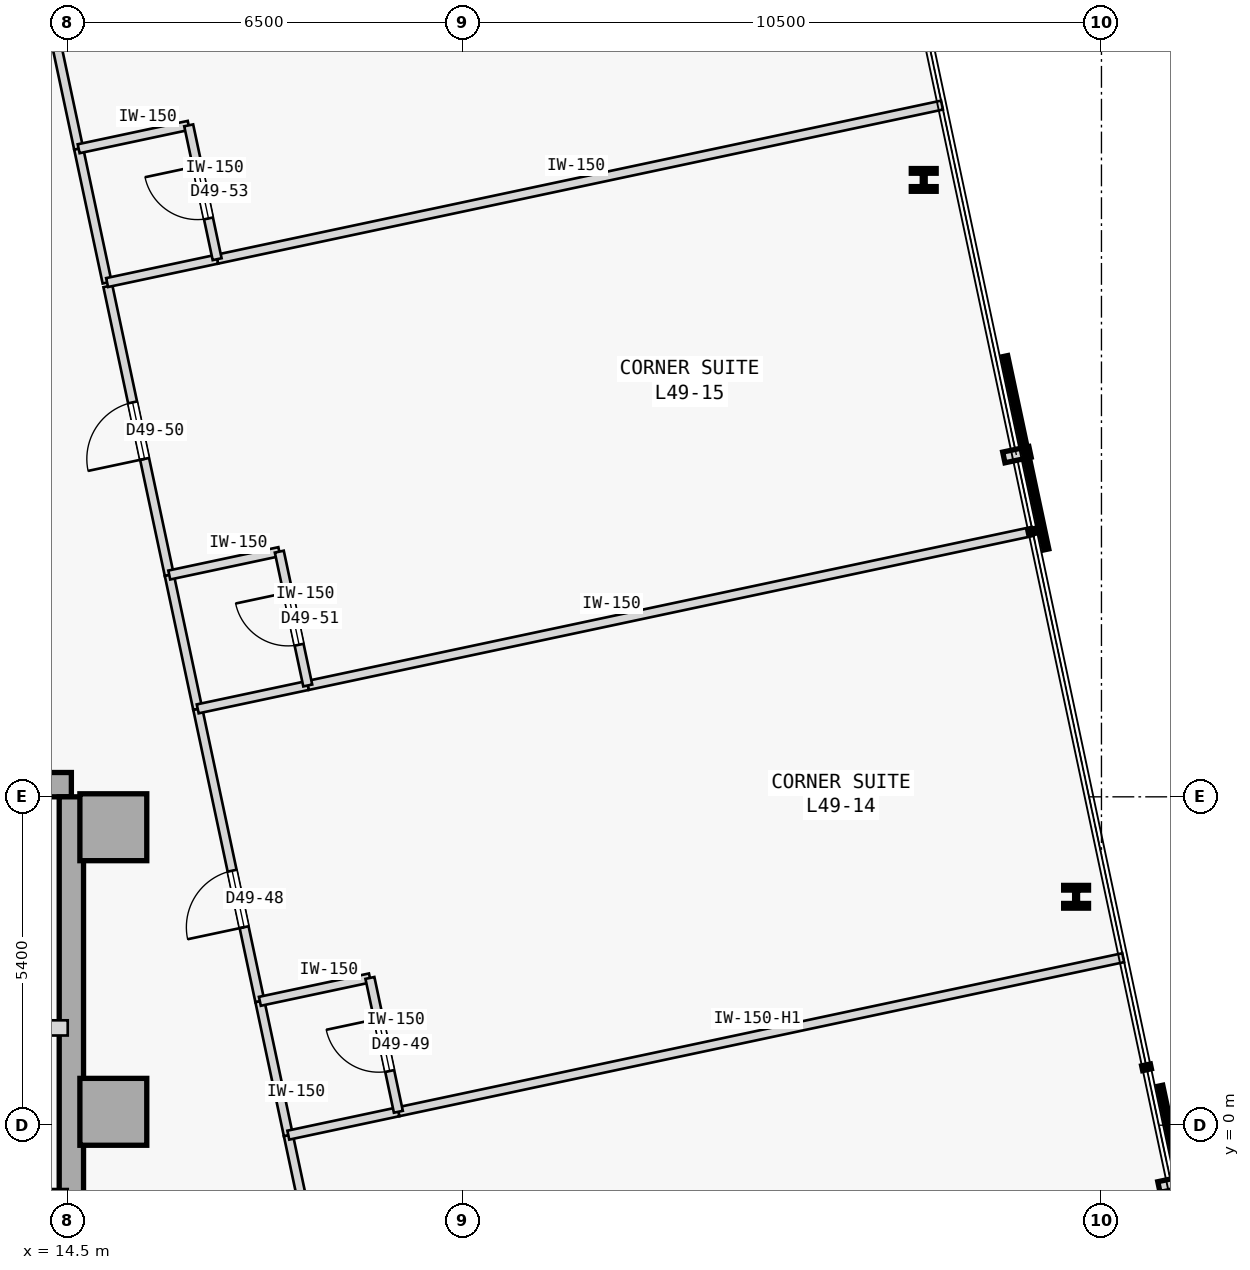
"""IFC4 building model, lengths in metres.
Left out: names, types, materials, properties, quantities, classifications, styles, units other than length and angle.
Written with IfcOpenShell. Run it as: python <this file> out.ifc"""

import sys

from ifc_helpers import new_model, si_unit, direction, frame, frame_2d, origin, origin_2d, place, context, subcontext, project, spatial, rectangle, i_section, extrude, element, fill, save


model = new_model("IFC4")
c1 = context("Model", 3, precision=1e-05, world=origin(), true_north=direction((0.0, 1.0)))
c2 = subcontext(c1, "Body", "Model", "MODEL_VIEW")
j1 = project(units=[si_unit("LENGTHUNIT", "METRE"), si_unit("PLANEANGLEUNIT", "RADIAN")], contexts=[c1])
p1 = place(None, origin())
s1 = spatial("IfcSite", under=j1, at=p1, CompositionType="ELEMENT")
p2 = place(p1, origin())
s2 = spatial("IfcBuilding", under=s1, at=p2, CompositionType="ELEMENT")
p3 = place(p2, frame((0.0, 0.0, 188.8)))
s3 = spatial("IfcBuildingStorey", under=s2, at=p3, CompositionType="ELEMENT", Elevation=188.8)
for number, where, z_axis, x_axis in (
    (1, (15.25, 4.9, 0.0), (0.0, 0.0, 1.0), (1.0, 0.0, 0.0)),
    (2, (15.25, 0.22, 0.0), (0.0, 0.0, 1.0), (1.0, 0.0, 0.0)),
):
    element("IfcColumn", number, at=place(p3, frame(where, z_axis=z_axis, x_axis=x_axis)), inside=s3, PredefinedType="COLUMN", context=c2, shape_type="SweptSolid", body=[
        extrude(rectangle(XDim=1.1, YDim=1.1, at=origin_2d()), origin(), (0.0, 0.0, 1.0), 3.4),
    ])
p4 = place(p3, frame((3.15, 5.6, 0.0), z_axis=(0.0, 0.0, 1.0), x_axis=(1.0, 0.0, 0.0)))
e3 = element("IfcWall", 3, at=p4, inside=s3, PredefinedType="SHEAR", context=c2, shape_type="SweptSolid", body=[
    extrude(rectangle(XDim=11.41, YDim=0.4, at=frame_2d((5.705, 0.0))), origin(), (0.0, 0.0, 1.0), 3.175),
])
p5 = place(p3, frame((14.56, -5.4, 0.0), z_axis=(0.0, 0.0, 1.0), x_axis=(0.0, 1.0, 0.0)))
e4 = element("IfcWall", 4, at=p5, inside=s3, PredefinedType="SHEAR", context=c2, shape_type="SweptSolid", body=[
    extrude(rectangle(XDim=10.8, YDim=0.4, at=frame_2d((5.4, 0.0))), origin(), (0.0, 0.0, 1.0), 3.175),
])
for number, where, z_axis, x_axis in (
    (5, (31.083, 3.756, 0.0), (0.0, 0.0, 1.0), (1.0, 0.0, 0.0)),
    (6, (28.577, 15.545, 0.0), (0.0, 0.0, 1.0), (1.0, 0.0, 0.0)),
):
    element("IfcColumn", number, at=place(p3, frame(where, z_axis=z_axis, x_axis=x_axis)), inside=s3, PredefinedType="COLUMN", context=c2, shape_type="SweptSolid", body=[
        extrude(i_section(OverallWidth=0.409, OverallDepth=0.374, WebThickness=0.048, FlangeThickness=0.077, FilletRadius=0.015, at=origin_2d()), origin(), (0.0, 0.0, 1.0), 3.4),
    ])
p6 = place(p3, frame((10.9, 1.6, 0.0), z_axis=(0.0, 0.0, 1.0), x_axis=(1.0, 0.0, 0.0)))
e7 = element("IfcWall", 7, at=p6, inside=s3, PredefinedType="STANDARD", context=c2, shape_type="SweptSolid", body=[
    extrude(rectangle(XDim=3.6, YDim=0.25, at=frame_2d((1.8, 0.0))), origin(), (0.0, 0.0, 1.0), 3.175),
])
p7 = place(p6, frame((1.62, 0.0, 0.0)))
e8 = element("IfcOpeningElement", 8, at=p7, cuts=e7, PredefinedType="OPENING", context=c2, shape_type="SweptSolid", body=[
    extrude(rectangle(XDim=1.05, YDim=2.15, at=frame_2d((0.525, 1.075))), frame((0.0, 0.135, 0.0), z_axis=(0.0, -1.0, 0.0), x_axis=(1.0, 0.0, 0.0)), (0.0, 0.0, 1.0), 0.27),
])
p8 = place(p3, frame((11.55, -1.15, 0.0), z_axis=(0.0, 0.0, 1.0), x_axis=(1.0, 0.0, 0.0)))
e9 = element("IfcWall", 9, at=p8, inside=s3, PredefinedType="STANDARD", context=c2, shape_type="SweptSolid", body=[
    extrude(rectangle(XDim=2.95, YDim=0.2, at=frame_2d((1.475, 0.0))), origin(), (0.0, 0.0, 1.0), 3.175),
])
p9 = place(p8, frame((0.75, 0.0, 0.0)))
e10 = element("IfcOpeningElement", 10, at=p9, cuts=e9, PredefinedType="OPENING", context=c2, shape_type="SweptSolid", body=[
    extrude(rectangle(XDim=1.05, YDim=2.18, at=frame_2d((0.525, 1.09))), frame((0.0, 0.11, 0.0), z_axis=(0.0, -1.0, 0.0), x_axis=(1.0, 0.0, 0.0)), (0.0, 0.0, 1.0), 0.22),
])
p10 = place(p3, frame((19.15, -4.972, 0.0), z_axis=(0.0, 0.0, 1.0), x_axis=(-0.207934781332, 0.978142692409, 0.0)))
e11 = element("IfcWall", 11, at=p10, inside=s3, PredefinedType="PARTITIONING", context=c2, shape_type="SweptSolid", body=[
    extrude(rectangle(XDim=4.916, YDim=0.15, at=frame_2d((2.458, 0.0))), origin(), (0.0, 0.0, 1.0), 3.175),
])
p11 = place(p10, frame((1.983, 0.0, 0.0)))
e12 = element("IfcOpeningElement", 12, at=p11, cuts=e11, PredefinedType="OPENING", context=c2, shape_type="SweptSolid", body=[
    extrude(rectangle(XDim=0.95, YDim=2.15, at=frame_2d((0.475, 1.075))), frame((0.0, 0.085, 0.0), z_axis=(0.0, -1.0, 0.0), x_axis=(1.0, 0.0, 0.0)), (0.0, 0.0, 1.0), 0.17),
])
p12 = place(p3, frame((17.66, 2.037, 0.0), z_axis=(0.0, 0.0, 1.0), x_axis=(-0.207894386012, 0.978151278824, 0.0)))
e13 = element("IfcWall", 13, at=p12, inside=s3, PredefinedType="PARTITIONING", context=c2, shape_type="SweptSolid", body=[
    extrude(rectangle(XDim=4.917, YDim=0.15, at=frame_2d((2.458, 0.0))), origin(), (0.0, 0.0, 1.0), 3.175),
])
p13 = place(p12, frame((1.246, 0.0, 0.0)))
e14 = element("IfcOpeningElement", 14, at=p13, cuts=e13, PredefinedType="OPENING", context=c2, shape_type="SweptSolid", body=[
    extrude(rectangle(XDim=0.95, YDim=2.15, at=frame_2d((0.475, 1.075))), frame((0.0, 0.085, 0.0), z_axis=(0.0, -1.0, 0.0), x_axis=(1.0, 0.0, 0.0)), (0.0, 0.0, 1.0), 0.17),
])
p14 = place(p3, frame((18.128, -0.164, 0.0), z_axis=(0.0, 0.0, 1.0), x_axis=(-0.207891197838, 0.978151956427, 0.0)))
e15 = element("IfcWall", 15, at=p14, inside=s3, PredefinedType="PARTITIONING", context=c2, shape_type="SweptSolid", body=[
    extrude(rectangle(XDim=2.25, YDim=0.15, at=frame_2d((1.125, 0.0))), origin(), (0.0, 0.0, 1.0), 3.175),
])
p15 = place(p3, frame((16.17, 9.047, 0.0), z_axis=(0.0, 0.0, 1.0), x_axis=(-0.20792851832, 0.978144023787, 0.0)))
e16 = element("IfcWall", 16, at=p15, inside=s3, PredefinedType="PARTITIONING", context=c2, shape_type="SweptSolid", body=[
    extrude(rectangle(XDim=4.855, YDim=0.15, at=frame_2d((2.428, 0.0))), origin(), (0.0, 0.0, 1.0), 3.175),
])
p16 = place(p15, frame((1.952, 0.0, 0.0)))
e17 = element("IfcOpeningElement", 17, at=p16, cuts=e16, PredefinedType="OPENING", context=c2, shape_type="SweptSolid", body=[
    extrude(rectangle(XDim=0.95, YDim=2.15, at=frame_2d((0.475, 1.075))), frame((0.0, 0.085, 0.0), z_axis=(0.0, -1.0, 0.0), x_axis=(1.0, 0.0, 0.0)), (0.0, 0.0, 1.0), 0.17),
])
p17 = place(p3, frame((16.638, 6.847, 0.0), z_axis=(0.0, 0.0, 1.0), x_axis=(-0.207913264065, 0.978147266328, 0.0)))
e18 = element("IfcWall", 18, at=p17, inside=s3, PredefinedType="PARTITIONING", context=c2, shape_type="SweptSolid", body=[
    extrude(rectangle(XDim=2.25, YDim=0.15, at=frame_2d((1.125, 0.0))), origin(), (0.0, 0.0, 1.0), 3.175),
])
p18 = place(p3, frame((14.68, 16.058, 0.0), z_axis=(0.0, 0.0, 1.0), x_axis=(-0.207887265829, 0.978152792107, 0.0)))
e19 = element("IfcWall", 19, at=p18, inside=s3, PredefinedType="PARTITIONING", context=c2, shape_type="SweptSolid", body=[
    extrude(rectangle(XDim=4.916, YDim=0.15, at=frame_2d((2.458, 0.0))), origin(), (0.0, 0.0, 1.0), 3.175),
])
p19 = place(p18, frame((1.983, 0.0, 0.0)))
e20 = element("IfcOpeningElement", 20, at=p19, cuts=e19, PredefinedType="OPENING", context=c2, shape_type="SweptSolid", body=[
    extrude(rectangle(XDim=0.95, YDim=2.15, at=frame_2d((0.475, 1.075))), frame((0.0, 0.085, 0.0), z_axis=(0.0, -1.0, 0.0), x_axis=(1.0, 0.0, 0.0)), (0.0, 0.0, 1.0), 0.17),
])
p20 = place(p3, frame((15.148, 13.857, 0.0), z_axis=(0.0, 0.0, 1.0), x_axis=(-0.207995007687, 0.978129887478, 0.0)))
e21 = element("IfcWall", 21, at=p20, inside=s3, PredefinedType="PARTITIONING", context=c2, shape_type="SweptSolid", body=[
    extrude(rectangle(XDim=2.25, YDim=0.15, at=frame_2d((1.125, 0.0))), origin(), (0.0, 0.0, 1.0), 3.175),
])
p21 = place(p3, frame((19.938, 0.221, 0.0), z_axis=(0.0, 0.0, 1.0), x_axis=(0.978144694478, 0.207925363208, 0.0)))
e22 = element("IfcWall", 22, at=p21, inside=s3, PredefinedType="PARTITIONING", context=c2, shape_type="SweptSolid", body=[
    extrude(rectangle(XDim=12.187, YDim=0.15, at=frame_2d((6.093, 0.0))), origin(), (0.0, 0.0, 1.0), 2.725),
])
p22 = place(p3, frame((18.128, -0.164, 0.0), z_axis=(0.0, 0.0, 1.0), x_axis=(0.978165892835, 0.207825614625, 0.0)))
e23 = element("IfcWall", 23, at=p22, inside=s3, PredefinedType="PARTITIONING", context=c2, shape_type="SweptSolid", body=[
    extrude(rectangle(XDim=1.85, YDim=0.15, at=frame_2d((0.925, 0.0))), origin(), (0.0, 0.0, 1.0), 3.175),
])
p23 = place(p3, frame((17.66, 2.037, 0.0), z_axis=(0.0, 0.0, 1.0), x_axis=(0.978160192495, 0.207852442415, 0.0)))
e24 = element("IfcWall", 24, at=p23, inside=s3, PredefinedType="PARTITIONING", context=c2, shape_type="SweptSolid", body=[
    extrude(rectangle(XDim=1.85, YDim=0.15, at=frame_2d((0.925, 0.0))), origin(), (0.0, 0.0, 1.0), 3.175),
])
p24 = place(p3, frame((19.938, 0.221, 0.0), z_axis=(0.0, 0.0, 1.0), x_axis=(-0.207995007687, 0.978129887478, 0.0)))
e25 = element("IfcWall", 25, at=p24, inside=s3, PredefinedType="PARTITIONING", context=c2, shape_type="SweptSolid", body=[
    extrude(rectangle(XDim=2.25, YDim=0.15, at=frame_2d((1.125, 0.0))), origin(), (0.0, 0.0, 1.0), 3.175),
])
p25 = place(p24, frame((0.685, 0.0, 0.0)))
e26 = element("IfcOpeningElement", 26, at=p25, cuts=e25, PredefinedType="OPENING", context=c2, shape_type="SweptSolid", body=[
    extrude(rectangle(XDim=0.88, YDim=2.15, at=frame_2d((0.44, 1.075))), frame((0.0, 0.085, 0.0), z_axis=(0.0, -1.0, 0.0), x_axis=(1.0, 0.0, 0.0)), (0.0, 0.0, 1.0), 0.17),
])
p26 = place(p3, frame((18.447, 7.231, 0.0), z_axis=(0.0, 0.0, 1.0), x_axis=(0.978149634612, 0.207902121941, 0.0)))
e27 = element("IfcWall", 27, at=p26, inside=s3, PredefinedType="PARTITIONING", context=c2, shape_type="SweptSolid", body=[
    extrude(rectangle(XDim=12.187, YDim=0.15, at=frame_2d((6.094, 0.0))), origin(), (0.0, 0.0, 1.0), 3.175),
])
p27 = place(p3, frame((16.638, 6.847, 0.0), z_axis=(0.0, 0.0, 1.0), x_axis=(0.978160192495, 0.207852442415, 0.0)))
e28 = element("IfcWall", 28, at=p27, inside=s3, PredefinedType="PARTITIONING", context=c2, shape_type="SweptSolid", body=[
    extrude(rectangle(XDim=1.85, YDim=0.15, at=frame_2d((0.925, 0.0))), origin(), (0.0, 0.0, 1.0), 3.175),
])
p28 = place(p3, frame((16.17, 9.047, 0.0), z_axis=(0.0, 0.0, 1.0), x_axis=(0.978133353907, 0.20797870558, 0.0)))
e29 = element("IfcWall", 29, at=p28, inside=s3, PredefinedType="PARTITIONING", context=c2, shape_type="SweptSolid", body=[
    extrude(rectangle(XDim=1.85, YDim=0.15, at=frame_2d((0.925, 0.0))), origin(), (0.0, 0.0, 1.0), 3.175),
])
p29 = place(p3, frame((18.447, 7.231, 0.0), z_axis=(0.0, 0.0, 1.0), x_axis=(-0.207891197838, 0.978151956427, 0.0)))
e30 = element("IfcWall", 30, at=p29, inside=s3, PredefinedType="PARTITIONING", context=c2, shape_type="SweptSolid", body=[
    extrude(rectangle(XDim=2.25, YDim=0.15, at=frame_2d((1.125, 0.0))), origin(), (0.0, 0.0, 1.0), 3.175),
])
p30 = place(p29, frame((0.685, 0.0, 0.0)))
e31 = element("IfcOpeningElement", 31, at=p30, cuts=e30, PredefinedType="OPENING", context=c2, shape_type="SweptSolid", body=[
    extrude(rectangle(XDim=0.88, YDim=2.15, at=frame_2d((0.44, 1.075))), frame((0.0, 0.085, 0.0), z_axis=(0.0, -1.0, 0.0), x_axis=(1.0, 0.0, 0.0)), (0.0, 0.0, 1.0), 0.17),
])
p31 = place(p3, frame((16.957, 14.242, 0.0), z_axis=(0.0, 0.0, 1.0), x_axis=(0.978148768696, 0.207906195911, 0.0)))
e32 = element("IfcWall", 32, at=p31, inside=s3, PredefinedType="PARTITIONING", context=c2, shape_type="SweptSolid", body=[
    extrude(rectangle(XDim=12.187, YDim=0.15, at=frame_2d((6.093, 0.0))), origin(), (0.0, 0.0, 1.0), 3.175),
])
for number, where, z_axis, x_axis in (
    (33, (15.148, 13.857, 0.0), (0.0, 0.0, 1.0), (0.978, 0.208, 0.0)),
    (34, (14.68, 16.058, 0.0), (0.0, 0.0, 1.0), (0.978, 0.208, 0.0)),
):
    element("IfcWall", number, at=place(p3, frame(where, z_axis=z_axis, x_axis=x_axis)), inside=s3, PredefinedType="PARTITIONING", context=c2, shape_type="SweptSolid", body=[
        extrude(rectangle(XDim=1.85, YDim=0.15, at=frame_2d((0.925, 0.0))), origin(), (0.0, 0.0, 1.0), 3.175),
    ])
p32 = place(p3, frame((16.957, 14.242, 0.0), z_axis=(0.0, 0.0, 1.0), x_axis=(-0.207913264065, 0.978147266328, 0.0)))
e35 = element("IfcWall", 35, at=p32, inside=s3, PredefinedType="PARTITIONING", context=c2, shape_type="SweptSolid", body=[
    extrude(rectangle(XDim=2.25, YDim=0.15, at=frame_2d((1.125, 0.0))), origin(), (0.0, 0.0, 1.0), 3.175),
])
p33 = place(p32, frame((0.685, 0.0, 0.0)))
e36 = element("IfcOpeningElement", 36, at=p33, cuts=e35, PredefinedType="OPENING", context=c2, shape_type="SweptSolid", body=[
    extrude(rectangle(XDim=0.88, YDim=2.15, at=frame_2d((0.44, 1.075))), frame((0.0, 0.085, 0.0), z_axis=(0.0, -1.0, 0.0), x_axis=(1.0, 0.0, 0.0)), (0.0, 0.0, 1.0), 0.17),
])
p34 = place(p13, origin())
e37 = element("IfcDoor", 37, at=p34, inside=s3, OperationType="SINGLE_SWING_LEFT", PredefinedType="DOOR", context=c2, shape_type="SweptSolid", body=[
    extrude(rectangle(XDim=0.95, YDim=2.15, at=frame_2d((0.475, 1.075))), frame((0.0, 0.025, 0.0), z_axis=(0.0, -1.0, 0.0), x_axis=(1.0, 0.0, 0.0)), (0.0, 0.0, 1.0), 0.05),
])
fill(e14, e37)
p35 = place(p25, origin())
e38 = element("IfcDoor", 38, at=p35, inside=s3, OperationType="SINGLE_SWING_RIGHT", PredefinedType="DOOR", context=c2, shape_type="SweptSolid", body=[
    extrude(rectangle(XDim=0.88, YDim=2.15, at=frame_2d((0.44, 1.075))), frame((0.0, 0.025, 0.0), z_axis=(0.0, -1.0, 0.0), x_axis=(1.0, 0.0, 0.0)), (0.0, 0.0, 1.0), 0.05),
])
fill(e26, e38)
p36 = place(p16, origin())
e39 = element("IfcDoor", 39, at=p36, inside=s3, OperationType="SINGLE_SWING_LEFT", PredefinedType="DOOR", context=c2, shape_type="SweptSolid", body=[
    extrude(rectangle(XDim=0.95, YDim=2.15, at=frame_2d((0.475, 1.075))), frame((0.0, 0.025, 0.0), z_axis=(0.0, -1.0, 0.0), x_axis=(1.0, 0.0, 0.0)), (0.0, 0.0, 1.0), 0.05),
])
fill(e17, e39)
p37 = place(p30, origin())
e40 = element("IfcDoor", 40, at=p37, inside=s3, OperationType="SINGLE_SWING_RIGHT", PredefinedType="DOOR", context=c2, shape_type="SweptSolid", body=[
    extrude(rectangle(XDim=0.88, YDim=2.15, at=frame_2d((0.44, 1.075))), frame((0.0, 0.025, 0.0), z_axis=(0.0, -1.0, 0.0), x_axis=(1.0, 0.0, 0.0)), (0.0, 0.0, 1.0), 0.05),
])
fill(e31, e40)
p38 = place(p33, origin())
e41 = element("IfcDoor", 41, at=p38, inside=s3, OperationType="SINGLE_SWING_RIGHT", PredefinedType="DOOR", context=c2, shape_type="SweptSolid", body=[
    extrude(rectangle(XDim=0.88, YDim=2.15, at=frame_2d((0.44, 1.075))), frame((0.0, 0.025, 0.0), z_axis=(0.0, -1.0, 0.0), x_axis=(1.0, 0.0, 0.0)), (0.0, 0.0, 1.0), 0.05),
])
fill(e36, e41)
save(model, sys.argv[1])
